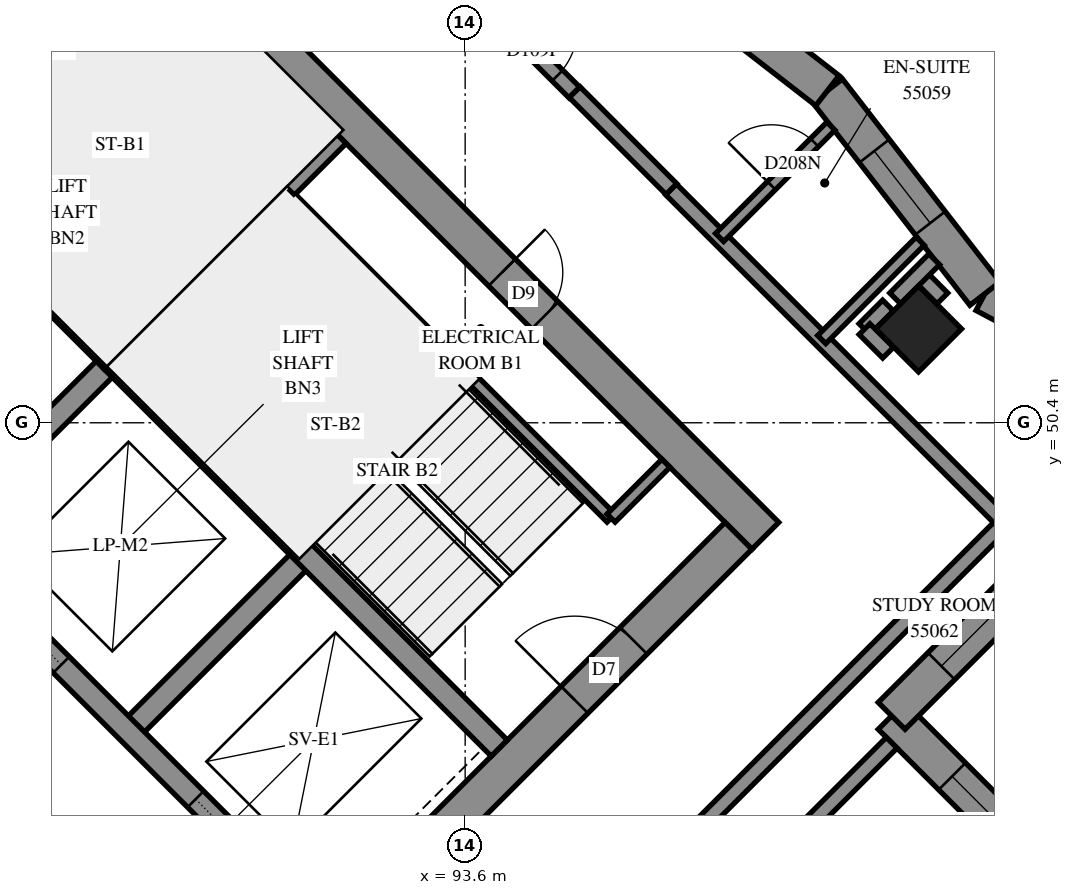
"""IFC4 building model, lengths in metres.
Left out: names, types, materials, properties, quantities, classifications, styles, units other than length and angle.
Written with IfcOpenShell. Run it as: python <this file> out.ifc"""

import sys

from ifc_helpers import new_model, si_unit, direction, frame, frame_2d, origin, origin_2d, place, context, subcontext, project, spatial, polyline, rectangle, outline, extrude, element, fill, save


model = new_model("IFC4")
c1 = context("Model", 3, precision=1e-05, world=origin(), true_north=direction((0.0, 1.0)))
c2 = subcontext(c1, "Body", "Model", "MODEL_VIEW")
j1 = project(units=[si_unit("LENGTHUNIT", "METRE"), si_unit("PLANEANGLEUNIT", "RADIAN")], contexts=[c1])
p1 = place(None, origin())
s1 = spatial("IfcSite", under=j1, at=p1, CompositionType="ELEMENT")
p2 = place(p1, origin())
s2 = spatial("IfcBuilding", under=s1, at=p2, CompositionType="ELEMENT")
p3 = place(p2, frame((0.0, 0.0, 203.2)))
s3 = spatial("IfcBuildingStorey", under=s2, at=p3, CompositionType="ELEMENT", Elevation=203.2)
p4 = place(p3, frame((99.565, 51.635, 0.0), z_axis=(0.0, 0.0, 1.0), x_axis=(0.7071067812, -0.7071067812, 0.0)))
e1 = element("IfcColumn", 1, at=p4, inside=s3, PredefinedType="COLUMN", context=c2, shape_type="SweptSolid", body=[
    extrude(rectangle(XDim=0.8, YDim=0.8, at=origin_2d()), origin(), (0.0, 0.0, 1.0), 3.1),
])
p5 = place(p3, frame((86.66, 59.802, -0.3), z_axis=(0.0, 0.0, 1.0), x_axis=(0.7071067812, -0.7071067812, 0.0)))
e2 = element("IfcWall", 2, at=p5, inside=s3, PredefinedType="SHEAR", context=c2, shape_type="SweptSolid", body=[
    extrude(rectangle(XDim=15.4, YDim=0.5, at=frame_2d((7.7, 0.0))), origin(), (0.0, 0.0, 1.0), 2.7),
])
p6 = place(p5, frame((10.5, 0.0, 0.3)))
e3 = element("IfcOpeningElement", 3, at=p6, cuts=e2, PredefinedType="OPENING", context=c2, shape_type="SweptSolid", body=[
    extrude(rectangle(XDim=0.8, YDim=2.1, at=frame_2d((0.4, 1.05))), frame((0.0, 0.26, 0.0), z_axis=(0.0, -1.0, 0.0), x_axis=(1.0, 0.0, 0.0)), (0.0, 0.0, 1.0), 0.52),
])
p7 = place(p3, frame((87.013, 38.731, -0.3), z_axis=(0.0, 0.0, 1.0), x_axis=(0.7071067812, 0.7071067812, 0.0)))
e4 = element("IfcWall", 4, at=p7, inside=s3, PredefinedType="SHEAR", context=c2, shape_type="SweptSolid", body=[
    extrude(rectangle(XDim=14.4, YDim=0.5, at=frame_2d((7.2, 0.0))), origin(), (0.0, 0.0, 1.0), 2.7),
])
p8 = place(p7, frame((4.55, 0.0, 0.3)))
e5 = element("IfcOpeningElement", 5, at=p8, cuts=e4, PredefinedType="OPENING", context=c2, shape_type="SweptSolid", body=[
    extrude(rectangle(XDim=1.1, YDim=2.1, at=frame_2d((0.55, 1.05))), frame((0.0, 0.26, 0.0), z_axis=(0.0, -1.0, 0.0), x_axis=(1.0, 0.0, 0.0)), (0.0, 0.0, 1.0), 0.52),
])
p9 = place(p7, frame((11.35, 0.0, 0.3)))
e6 = element("IfcOpeningElement", 6, at=p9, cuts=e4, PredefinedType="OPENING", context=c2, shape_type="SweptSolid", body=[
    extrude(rectangle(XDim=1.1, YDim=2.1, at=frame_2d((0.55, 1.05))), frame((0.0, 0.26, 0.0), z_axis=(0.0, -1.0, 0.0), x_axis=(1.0, 0.0, 0.0)), (0.0, 0.0, 1.0), 0.52),
])
for number, where, z_axis, x_axis in (
    (7, (86.625, 48.878, 0.0), (0.0, 0.0, 1.0), (0.707, 0.707, 0.0)),
    (8, (89.17, 46.332, 0.0), (0.0, 0.0, 1.0), (0.707, 0.707, 0.0)),
):
    element("IfcWall", number, at=place(p3, frame(where, z_axis=z_axis, x_axis=x_axis)), inside=s3, PredefinedType="SOLIDWALL", context=c2, shape_type="SweptSolid", body=[
        extrude(rectangle(XDim=3.3, YDim=0.3, at=frame_2d((1.65, 0.0))), origin(), (0.0, 0.0, 1.0), 3.1),
    ])
p10 = place(p3, frame((78.988, 51.423, 0.0), z_axis=(0.0, 0.0, 1.0), x_axis=(0.7071067812, -0.7071067812, 0.0)))
e9 = element("IfcWall", 9, at=p10, inside=s3, PredefinedType="SOLIDWALL", context=c2, shape_type="SweptSolid", body=[
    extrude(rectangle(XDim=14.4, YDim=0.3, at=frame_2d((7.2, 0.0))), origin(), (0.0, 0.0, 1.0), 3.1),
])
p11 = place(p10, frame((1.35, 0.0, 0.0)))
e10 = element("IfcOpeningElement", 10, at=p11, cuts=e9, PredefinedType="OPENING", context=c2, shape_type="SweptSolid", body=[
    extrude(rectangle(XDim=0.9, YDim=2.1, at=frame_2d((0.45, 1.05))), frame((0.0, 0.16, 0.0), z_axis=(0.0, -1.0, 0.0), x_axis=(1.0, 0.0, 0.0)), (0.0, 0.0, 1.0), 0.32),
])
p12 = place(p10, frame((4.95, 0.0, 0.0)))
e11 = element("IfcOpeningElement", 11, at=p12, cuts=e9, PredefinedType="OPENING", context=c2, shape_type="SweptSolid", body=[
    extrude(rectangle(XDim=0.9, YDim=2.1, at=frame_2d((0.45, 1.05))), frame((0.0, 0.16, 0.0), z_axis=(0.0, -1.0, 0.0), x_axis=(1.0, 0.0, 0.0)), (0.0, 0.0, 1.0), 0.32),
])
p13 = place(p10, frame((8.55, 0.0, 0.0)))
e12 = element("IfcOpeningElement", 12, at=p13, cuts=e9, PredefinedType="OPENING", context=c2, shape_type="SweptSolid", body=[
    extrude(rectangle(XDim=0.9, YDim=2.1, at=frame_2d((0.45, 1.05))), frame((0.0, 0.16, 0.0), z_axis=(0.0, -1.0, 0.0), x_axis=(1.0, 0.0, 0.0)), (0.0, 0.0, 1.0), 0.32),
])
p14 = place(p10, frame((12.05, 0.0, 0.0)))
e13 = element("IfcOpeningElement", 13, at=p14, cuts=e9, PredefinedType="OPENING", context=c2, shape_type="SweptSolid", body=[
    extrude(rectangle(XDim=1.1, YDim=2.1, at=frame_2d((0.55, 1.05))), frame((0.0, 0.16, 0.0), z_axis=(0.0, -1.0, 0.0), x_axis=(1.0, 0.0, 0.0)), (0.0, 0.0, 1.0), 0.32),
])
p15 = place(p3, frame((81.534, 53.969, 0.0), z_axis=(0.0, 0.0, 1.0), x_axis=(0.707103309, -0.7071102534, 0.0)))
e14 = element("IfcWall", 14, at=p15, inside=s3, PredefinedType="SOLIDWALL", context=c2, shape_type="SweptSolid", body=[
    extrude(rectangle(XDim=14.4, YDim=0.3, at=frame_2d((7.2, 0.0))), origin(), (0.0, 0.0, 1.0), 3.1),
])
p16 = place(p15, frame((1.25, 0.0, 0.0)))
e15 = element("IfcOpeningElement", 15, at=p16, cuts=e14, PredefinedType="OPENING", context=c2, shape_type="SweptSolid", body=[
    extrude(rectangle(XDim=1.1, YDim=2.1, at=frame_2d((0.55, 1.05))), frame((0.0, 0.16, 0.0), z_axis=(0.0, -1.0, 0.0), x_axis=(1.0, 0.0, 0.0)), (0.0, 0.0, 1.0), 0.32),
])
p17 = place(p15, frame((4.85, 0.0, 0.0)))
e16 = element("IfcOpeningElement", 16, at=p17, cuts=e14, PredefinedType="OPENING", context=c2, shape_type="SweptSolid", body=[
    extrude(rectangle(XDim=1.1, YDim=2.1, at=frame_2d((0.55, 1.05))), frame((0.0, 0.16, 0.0), z_axis=(0.0, -1.0, 0.0), x_axis=(1.0, 0.0, 0.0)), (0.0, 0.0, 1.0), 0.32),
])
p18 = place(p15, frame((8.45, 0.0, 0.0)))
e17 = element("IfcOpeningElement", 17, at=p18, cuts=e14, PredefinedType="OPENING", context=c2, shape_type="SweptSolid", body=[
    extrude(rectangle(XDim=1.1, YDim=2.1, at=frame_2d((0.55, 1.05))), frame((0.0, 0.16, 0.0), z_axis=(0.0, -1.0, 0.0), x_axis=(1.0, 0.0, 0.0)), (0.0, 0.0, 1.0), 0.32),
])
p19 = place(p15, frame((12.05, 0.0, 0.0)))
e18 = element("IfcOpeningElement", 18, at=p19, cuts=e14, PredefinedType="OPENING", context=c2, shape_type="SweptSolid", body=[
    extrude(rectangle(XDim=1.1, YDim=2.1, at=frame_2d((0.55, 1.05))), frame((0.0, 0.16, 0.0), z_axis=(0.0, -1.0, 0.0), x_axis=(1.0, 0.0, 0.0)), (0.0, 0.0, 1.0), 0.32),
])
for number, where, z_axis, x_axis in (
    (19, (83.867, 56.302, 0.0), (0.0, 0.0, 1.0), (0.707, -0.707, 0.0)),
    (20, (88.958, 51.211, 0.0), (0.0, 0.0, 1.0), (0.707, -0.707, 0.0)),
):
    element("IfcWall", number, at=place(p3, frame(where, z_axis=z_axis, x_axis=x_axis)), inside=s3, PredefinedType="SOLIDWALL", context=c2, shape_type="SweptSolid", body=[
        extrude(rectangle(XDim=7.2, YDim=0.3, at=frame_2d((3.6, 0.0))), origin(), (0.0, 0.0, 1.0), 3.1),
    ])
p20 = place(p3, frame((88.958, 51.211, 0.0), z_axis=(0.0, 0.0, 1.0), x_axis=(0.7071067812, 0.7071067812, 0.0)))
e21 = element("IfcWall", 21, at=p20, inside=s3, PredefinedType="SOLIDWALL", context=c2, shape_type="SweptSolid", body=[
    extrude(rectangle(XDim=4.2, YDim=0.3, at=frame_2d((2.1, 0.0))), origin(), (0.0, 0.0, 1.0), 3.1),
])
p21 = place(p3, frame((102.673, 43.083, 0.0), z_axis=(0.0, 0.0, 1.0), x_axis=(-0.7071067812, 0.7071067812, 0.0)))
e22 = element("IfcWall", 22, at=p21, inside=s3, PredefinedType="SOLIDWALL", context=c2, shape_type="SweptSolid", body=[
    extrude(outline(polyline([(-0.154, -0.25), (4.646, -0.25), (5.146, 0.25), (0.154, 0.25), (-0.154, -0.25)])), origin(), (0.0, 0.0, 1.0), 3.1),
])
p22 = place(p21, frame((1.97, 0.0, 0.6)))
e23 = element("IfcOpeningElement", 23, at=p22, cuts=e22, PredefinedType="OPENING", context=c2, shape_type="SweptSolid", body=[
    extrude(rectangle(XDim=1.8, YDim=1.9, at=frame_2d((0.9, 0.95))), frame((0.0, 0.26, 0.0), z_axis=(0.0, -1.0, 0.0), x_axis=(1.0, 0.0, 0.0)), (0.0, 0.0, 1.0), 0.52),
])
p23 = place(p3, frame((99.211, 46.544, 0.0), z_axis=(0.0, 0.0, 1.0), x_axis=(0.7071067812, 0.7071067812, 0.0)))
e24 = element("IfcWall", 24, at=p23, inside=s3, PredefinedType="SOLIDWALL", context=c2, shape_type="SweptSolid", body=[
    extrude(outline(polyline([(0.25, -0.25), (6.071, -0.25), (5.395, 0.25), (-0.25, 0.25), (0.25, -0.25)])), origin(), (0.0, 0.0, 1.0), 3.1),
])
p24 = place(p23, frame((0.925, 0.0, 0.6)))
e25 = element("IfcOpeningElement", 25, at=p24, cuts=e24, PredefinedType="OPENING", context=c2, shape_type="SweptSolid", body=[
    extrude(rectangle(XDim=1.8, YDim=1.9, at=frame_2d((0.9, 0.95))), frame((0.0, 0.26, 0.0), z_axis=(0.0, -1.0, 0.0), x_axis=(1.0, 0.0, 0.0)), (0.0, 0.0, 1.0), 0.52),
])
p25 = place(p3, frame((103.265, 50.598, 0.0), z_axis=(0.0, 0.0, 1.0), x_axis=(-0.883249994, 0.4689023865, 0.0)))
e26 = element("IfcWall", 26, at=p25, inside=s3, PredefinedType="SOLIDWALL", context=c2, shape_type="SweptSolid", body=[
    extrude(outline(polyline([(-0.338, -0.25), (3.147, -0.25), (3.254, 0.25), (0.338, 0.25), (-0.338, -0.25)])), origin(), (0.0, 0.0, 1.0), 3.1),
])
p26 = place(p25, frame((1.169, 0.0, 0.45)))
e27 = element("IfcOpeningElement", 27, at=p26, cuts=e26, PredefinedType="OPENING", context=c2, shape_type="SweptSolid", body=[
    extrude(rectangle(XDim=1.2, YDim=2.5, at=frame_2d((0.6, 1.25))), frame((0.0, 0.26, 0.0), z_axis=(0.0, -1.0, 0.0), x_axis=(1.0, 0.0, 0.0)), (0.0, 0.0, 1.0), 0.52),
])
p27 = place(p3, frame((100.438, 52.099, 0.0), z_axis=(0.0, 0.0, 1.0), x_axis=(-0.6128751624, 0.7901797487, 0.0)))
e28 = element("IfcWall", 28, at=p27, inside=s3, PredefinedType="SOLIDWALL", context=c2, shape_type="SweptSolid", body=[
    extrude(outline(polyline([(0.054, -0.25), (3.412, -0.25), (3.349, 0.25), (-0.054, 0.25), (0.054, -0.25)])), origin(), (0.0, 0.0, 1.0), 3.1),
])
p28 = place(p27, frame((1.175, 0.0, 0.45)))
e29 = element("IfcOpeningElement", 29, at=p28, cuts=e28, PredefinedType="OPENING", context=c2, shape_type="SweptSolid", body=[
    extrude(rectangle(XDim=1.2, YDim=2.5, at=frame_2d((0.6, 1.25))), frame((0.0, 0.26, 0.0), z_axis=(0.0, -1.0, 0.0), x_axis=(1.0, 0.0, 0.0)), (0.0, 0.0, 1.0), 0.52),
])
p29 = place(p3, frame((98.366, 54.77, 0.0), z_axis=(0.0, 0.0, 1.0), x_axis=(-0.7901836045, 0.6128701911, 0.0)))
e30 = element("IfcWall", 30, at=p29, inside=s3, PredefinedType="SOLIDWALL", context=c2, shape_type="SweptSolid", body=[
    extrude(outline(polyline([(-0.032, -0.25), (3.327, -0.25), (3.39, 0.25), (0.032, 0.25), (-0.032, -0.25)])), origin(), (0.0, 0.0, 1.0), 3.1),
])
p30 = place(p29, frame((1.249, 0.0, 0.45)))
e31 = element("IfcOpeningElement", 31, at=p30, cuts=e30, PredefinedType="OPENING", context=c2, shape_type="SweptSolid", body=[
    extrude(rectangle(XDim=1.2, YDim=2.5, at=frame_2d((0.6, 1.25))), frame((0.0, 0.26, 0.0), z_axis=(0.0, -1.0, 0.0), x_axis=(1.0, 0.0, 0.0)), (0.0, 0.0, 1.0), 0.52),
])
p31 = place(p3, frame((91.313, 53.354, 0.0), z_axis=(0.0, 0.0, 1.0), x_axis=(0.7071067812, -0.7071067812, 0.0)))
e32 = element("IfcWall", 32, at=p31, inside=s3, PredefinedType="PARTITIONING", context=c2, shape_type="SweptSolid", body=[
    extrude(rectangle(XDim=5.95, YDim=0.15, at=frame_2d((2.975, 0.0))), origin(), (0.0, 0.0, 1.0), 3.1),
])
p32 = place(p3, frame((95.52, 49.146, 0.0), z_axis=(0.0, 0.0, 1.0), x_axis=(0.7071067812, 0.7071067812, 0.0)))
e33 = element("IfcWall", 33, at=p32, inside=s3, PredefinedType="PARTITIONING", context=c2, shape_type="SweptSolid", body=[
    extrude(rectangle(XDim=1.02, YDim=0.15, at=frame_2d((0.51, 0.0))), origin(), (0.0, 0.0, 1.0), 3.1),
])
p33 = place(p3, frame((93.695, 42.091, 0.0), z_axis=(0.0, 0.0, 1.0), x_axis=(0.7071067812, 0.7071067812, 0.0)))
e34 = element("IfcWall", 34, at=p33, inside=s3, PredefinedType="PARTITIONING", context=c2, shape_type="SweptSolid", body=[
    extrude(rectangle(XDim=9.899, YDim=0.2, at=frame_2d((4.95, 0.0))), origin(), (0.0, 0.0, 1.0), 3.1),
])
p34 = place(p33, frame((0.255, 0.0, 0.0)))
e35 = element("IfcOpeningElement", 35, at=p34, cuts=e34, PredefinedType="OPENING", context=c2, shape_type="SweptSolid", body=[
    extrude(rectangle(XDim=1.0, YDim=2.1, at=frame_2d((0.5, 1.05))), frame((0.0, 0.11, 0.0), z_axis=(0.0, -1.0, 0.0), x_axis=(1.0, 0.0, 0.0)), (0.0, 0.0, 1.0), 0.22),
])
p35 = place(p3, frame((94.402, 41.382, 0.0), z_axis=(0.0, 0.0, 1.0), x_axis=(0.7072538072, 0.7069597246, 0.0)))
e36 = element("IfcWall", 36, at=p35, inside=s3, PredefinedType="PARTITIONING", context=c2, shape_type="SweptSolid", body=[
    extrude(rectangle(XDim=6.801, YDim=0.2, at=frame_2d((3.4, 0.0))), origin(), (0.0, 0.0, 1.0), 3.1),
])
p36 = place(p3, frame((96.309, 53.471, 0.0), z_axis=(0.0, 0.0, 1.0), x_axis=(0.7071067812, -0.7071067812, 0.0)))
e37 = element("IfcWall", 37, at=p36, inside=s3, PredefinedType="PARTITIONING", context=c2, shape_type="SweptSolid", body=[
    extrude(rectangle(XDim=6.2, YDim=0.2, at=frame_2d((3.1, 0.0))), origin(), (0.0, 0.0, 1.0), 3.1),
])
p37 = place(p3, frame((96.948, 52.838, 0.0), z_axis=(0.0, 0.0, 1.0), x_axis=(0.7070826384, 0.7071309232, 0.0)))
e38 = element("IfcWall", 38, at=p37, inside=s3, PredefinedType="PARTITIONING", context=c2, shape_type="SweptSolid", body=[
    extrude(rectangle(XDim=2.071, YDim=0.15, at=frame_2d((1.036, 0.0))), origin(), (0.0, 0.0, 1.0), 3.1),
])
p38 = place(p37, frame((0.965, 0.0, 0.0)))
e39 = element("IfcOpeningElement", 39, at=p38, cuts=e38, PredefinedType="OPENING", context=c2, shape_type="SweptSolid", body=[
    extrude(rectangle(XDim=0.8, YDim=2.1, at=frame_2d((0.4, 1.05))), frame((0.0, 0.085, 0.0), z_axis=(0.0, -1.0, 0.0), x_axis=(1.0, 0.0, 0.0)), (0.0, 0.0, 1.0), 0.17),
])
p39 = place(p3, frame((93.763, 56.017, 0.0), z_axis=(0.0, 0.0, 1.0), x_axis=(0.7076620277, -0.7065510983, 0.0)))
e40 = element("IfcWall", 40, at=p39, inside=s3, PredefinedType="PARTITIONING", context=c2, shape_type="SweptSolid", body=[
    extrude(rectangle(XDim=1.8, YDim=0.2, at=frame_2d((0.9, 0.0))), origin(), (0.0, 0.0, 1.0), 3.1),
])
p40 = place(p39, frame((0.585, 0.0, 0.0)))
e41 = element("IfcOpeningElement", 41, at=p40, cuts=e40, PredefinedType="OPENING", context=c2, shape_type="SweptSolid", body=[
    extrude(rectangle(XDim=0.9, YDim=2.1, at=frame_2d((0.45, 1.05))), frame((0.0, 0.11, 0.0), z_axis=(0.0, -1.0, 0.0), x_axis=(1.0, 0.0, 0.0)), (0.0, 0.0, 1.0), 0.22),
])
p41 = place(p3, frame((95.041, 54.749, 0.0), z_axis=(0.0, 0.0, 1.0), x_axis=(0.7065510983, -0.7076620277, 0.0)))
e42 = element("IfcWall", 42, at=p41, inside=s3, PredefinedType="PARTITIONING", context=c2, shape_type="SweptSolid", body=[
    extrude(rectangle(XDim=1.8, YDim=0.2, at=frame_2d((0.9, 0.0))), origin(), (0.0, 0.0, 1.0), 3.1),
])
p42 = place(p3, frame((98.291, 51.495, 0.0), z_axis=(0.0, 0.0, 1.0), x_axis=(0.7071067812, 0.7071067812, 0.0)))
e43 = element("IfcWall", 43, at=p42, inside=s3, PredefinedType="PARTITIONING", context=c2, shape_type="SweptSolid", body=[
    extrude(rectangle(XDim=1.831, YDim=0.15, at=frame_2d((0.915, 0.0))), origin(), (0.0, 0.0, 1.0), 3.1),
])
for number, where, z_axis, x_axis in (
    (44, (98.853, 51.633, 0.0), (0.0, 0.0, 1.0), (0.707, 0.707, 0.0)),
    (45, (98.854, 51.632, 0.0), (0.0, 0.0, 1.0), (0.707, -0.707, 0.0)),
    (46, (99.568, 52.346, 0.0), (0.0, 0.0, 1.0), (0.707, -0.707, 0.0)),
):
    element("IfcWall", number, at=place(p3, frame(where, z_axis=z_axis, x_axis=x_axis)), inside=s3, PredefinedType="PARTITIONING", context=c2, shape_type="SweptSolid", body=[
        extrude(rectangle(XDim=0.438, YDim=0.2, at=frame_2d((0.219, 0.0))), origin(), (0.0, 0.0, 1.0), 3.1),
    ])
p43 = place(p3, frame((99.257, 52.037, 0.0), z_axis=(0.0, 0.0, 1.0), x_axis=(0.7071067812, 0.7071067812, 0.0)))
e47 = element("IfcWall", 47, at=p43, inside=s3, PredefinedType="PARTITIONING", context=c2, shape_type="SweptSolid", body=[
    extrude(rectangle(XDim=0.727, YDim=0.2, at=frame_2d((0.363, 0.0))), origin(), (0.0, 0.0, 1.0), 3.1),
])
p44 = place(p22, origin())
e48 = element("IfcWindow", 48, at=p44, inside=s3, PartitioningType="SINGLE_PANEL", PredefinedType="WINDOW", context=c2, shape_type="SweptSolid", body=[
    extrude(rectangle(XDim=1.8, YDim=1.9, at=frame_2d((0.9, 0.95))), frame((0.0, 0.18, 0.0), z_axis=(0.0, -1.0, 0.0), x_axis=(1.0, 0.0, 0.0)), (0.0, 0.0, 1.0), 0.06),
])
fill(e23, e48)
p45 = place(p24, origin())
e49 = element("IfcWindow", 49, at=p45, inside=s3, PartitioningType="SINGLE_PANEL", PredefinedType="WINDOW", context=c2, shape_type="SweptSolid", body=[
    extrude(rectangle(XDim=1.8, YDim=1.9, at=frame_2d((0.9, 0.95))), frame((0.0, 0.18, 0.0), z_axis=(0.0, -1.0, 0.0), x_axis=(1.0, 0.0, 0.0)), (0.0, 0.0, 1.0), 0.06),
])
fill(e25, e49)
p46 = place(p28, origin())
e50 = element("IfcWindow", 50, at=p46, inside=s3, PartitioningType="SINGLE_PANEL", PredefinedType="WINDOW", context=c2, shape_type="SweptSolid", body=[
    extrude(rectangle(XDim=1.2, YDim=2.5, at=frame_2d((0.6, 1.25))), frame((0.0, 0.18, 0.0), z_axis=(0.0, -1.0, 0.0), x_axis=(1.0, 0.0, 0.0)), (0.0, 0.0, 1.0), 0.06),
])
fill(e29, e50)
p47 = place(p6, origin())
e51 = element("IfcDoor", 51, at=p47, inside=s3, OperationType="SINGLE_SWING_RIGHT", PredefinedType="DOOR", context=c2, shape_type="SweptSolid", body=[
    extrude(rectangle(XDim=0.8, YDim=2.1, at=frame_2d((0.4, 1.05))), frame((0.0, 0.025, 0.0), z_axis=(0.0, -1.0, 0.0), x_axis=(1.0, 0.0, 0.0)), (0.0, 0.0, 1.0), 0.05),
])
fill(e3, e51)
p48 = place(p9, origin())
e52 = element("IfcDoor", 52, at=p48, inside=s3, OperationType="SINGLE_SWING_RIGHT", PredefinedType="DOOR", context=c2, shape_type="SweptSolid", body=[
    extrude(rectangle(XDim=1.1, YDim=2.1, at=frame_2d((0.55, 1.05))), frame((0.0, 0.025, 0.0), z_axis=(0.0, -1.0, 0.0), x_axis=(1.0, 0.0, 0.0)), (0.0, 0.0, 1.0), 0.05),
])
fill(e6, e52)
p49 = place(p18, origin())
e53 = element("IfcDoor", 53, at=p49, inside=s3, OperationType="SLIDING_TO_LEFT", PredefinedType="DOOR", context=c2, shape_type="SweptSolid", body=[
    extrude(rectangle(XDim=1.1, YDim=2.1, at=frame_2d((0.55, 1.05))), frame((0.0, 0.025, 0.0), z_axis=(0.0, -1.0, 0.0), x_axis=(1.0, 0.0, 0.0)), (0.0, 0.0, 1.0), 0.05),
])
fill(e17, e53)
p50 = place(p19, origin())
e54 = element("IfcDoor", 54, at=p50, inside=s3, OperationType="SLIDING_TO_RIGHT", PredefinedType="DOOR", context=c2, shape_type="SweptSolid", body=[
    extrude(rectangle(XDim=1.1, YDim=2.1, at=frame_2d((0.55, 1.05))), frame((0.0, 0.025, 0.0), z_axis=(0.0, -1.0, 0.0), x_axis=(1.0, 0.0, 0.0)), (0.0, 0.0, 1.0), 0.05),
])
fill(e18, e54)
p51 = place(p40, origin())
e55 = element("IfcDoor", 55, at=p51, inside=s3, OperationType="SINGLE_SWING_LEFT", PredefinedType="DOOR", context=c2, shape_type="SweptSolid", body=[
    extrude(rectangle(XDim=0.9, YDim=2.1, at=frame_2d((0.45, 1.05))), frame((0.0, 0.025, 0.0), z_axis=(0.0, -1.0, 0.0), x_axis=(1.0, 0.0, 0.0)), (0.0, 0.0, 1.0), 0.05),
])
fill(e41, e55)
p52 = place(p38, origin())
e56 = element("IfcDoor", 56, at=p52, inside=s3, OperationType="SINGLE_SWING_RIGHT", PredefinedType="DOOR", context=c2, shape_type="SweptSolid", body=[
    extrude(rectangle(XDim=0.8, YDim=2.1, at=frame_2d((0.4, 1.05))), frame((0.0, 0.025, 0.0), z_axis=(0.0, -1.0, 0.0), x_axis=(1.0, 0.0, 0.0)), (0.0, 0.0, 1.0), 0.05),
])
fill(e39, e56)
save(model, sys.argv[1])
